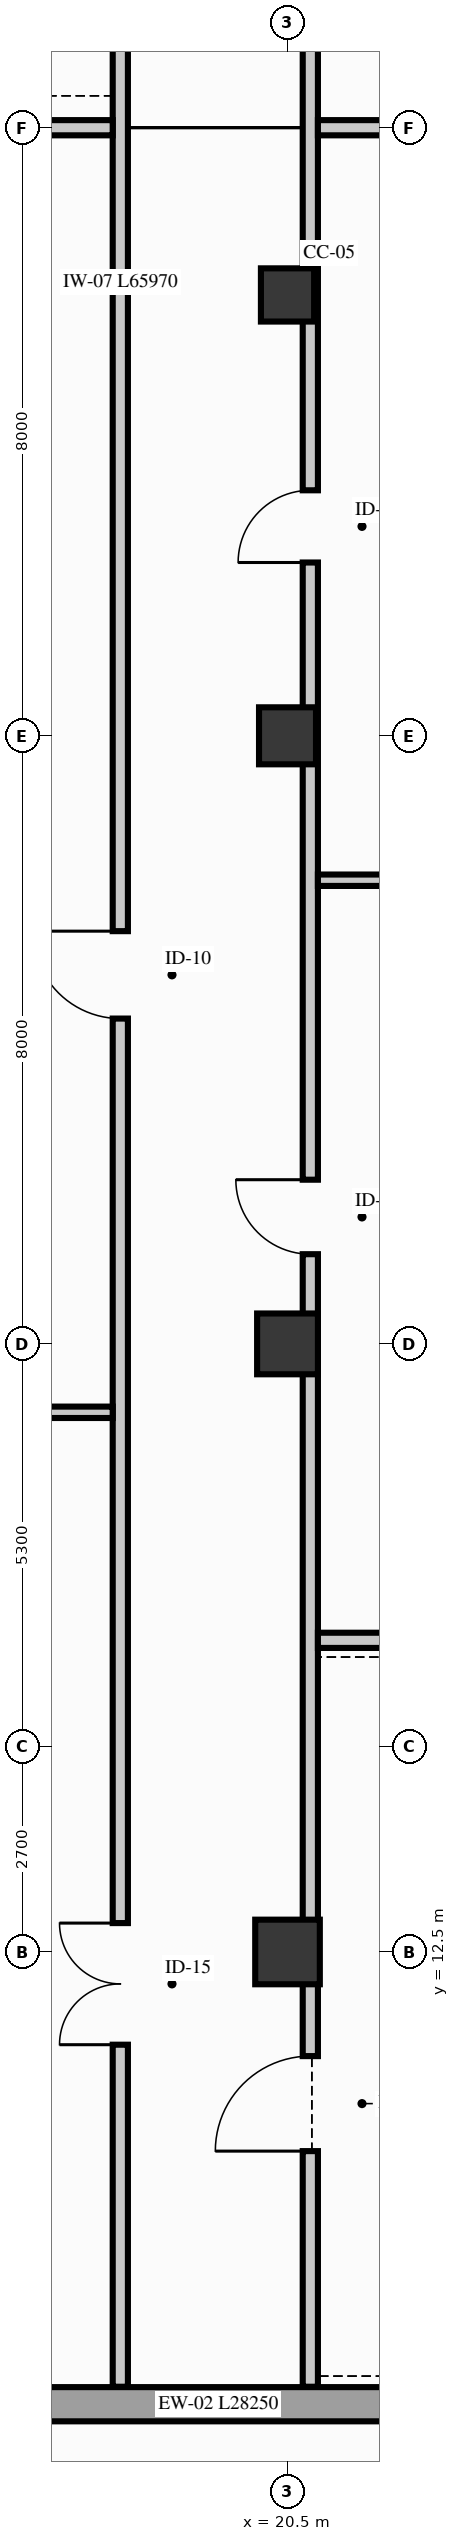
"""IFC4 building model, lengths in metres.
Left out: names, types, materials, properties, quantities, classifications, styles, units other than length and angle.
Written with IfcOpenShell. Run it as: python <this file> out.ifc"""

import sys

from ifc_helpers import new_model, si_unit, direction, frame, frame_2d, origin, origin_2d, place, context, subcontext, project, spatial, rectangle, extrude, element, fill, save


model = new_model("IFC4")
c1 = context("Model", 3, precision=1e-05, world=origin(), true_north=direction((0.0, 1.0)))
c2 = subcontext(c1, "Body", "Model", "MODEL_VIEW")
j1 = project(units=[si_unit("LENGTHUNIT", "METRE"), si_unit("PLANEANGLEUNIT", "RADIAN")], contexts=[c1])
p1 = place(None, origin())
s1 = spatial("IfcSite", under=j1, at=p1, CompositionType="ELEMENT")
p2 = place(p1, origin())
s2 = spatial("IfcBuilding", under=s1, at=p2, CompositionType="ELEMENT")
p3 = place(p2, origin())
s3 = spatial("IfcBuildingStorey", under=s2, at=p3, CompositionType="ELEMENT", Elevation=0.0)
p4 = place(p3, frame((20.5, 12.5, 0.0), z_axis=(0.0, 0.0, 1.0), x_axis=(1.0, 0.0, 0.0)))
e1 = element("IfcColumn", 1, at=p4, inside=s3, PredefinedType="COLUMN", context=c2, shape_type="SweptSolid", body=[
    extrude(rectangle(XDim=0.85, YDim=0.85, at=origin_2d()), origin(), (0.0, 0.0, 1.0), 5.1),
])
p5 = place(p3, frame((20.5, 20.5, 0.0), z_axis=(0.0, 0.0, 1.0), x_axis=(1.0, 0.0, 0.0)))
e2 = element("IfcColumn", 2, at=p5, inside=s3, PredefinedType="COLUMN", context=c2, shape_type="SweptSolid", body=[
    extrude(rectangle(XDim=0.8, YDim=0.8, at=origin_2d()), origin(), (0.0, 0.0, 1.0), 5.1),
])
p6 = place(p3, frame((20.5, 28.5, 0.0), z_axis=(0.0, 0.0, 1.0), x_axis=(1.0, 0.0, 0.0)))
e3 = element("IfcColumn", 3, at=p6, inside=s3, PredefinedType="COLUMN", context=c2, shape_type="SweptSolid", body=[
    extrude(rectangle(XDim=0.75, YDim=0.75, at=origin_2d()), origin(), (0.0, 0.0, 1.0), 5.1),
])
p7 = place(p3, frame((20.5, 34.3, 0.0), z_axis=(0.0, 0.0, 1.0), x_axis=(1.0, 0.0, 0.0)))
e4 = element("IfcColumn", 4, at=p7, inside=s3, PredefinedType="COLUMN", context=c2, shape_type="SweptSolid", body=[
    extrude(rectangle(XDim=0.7, YDim=0.7, at=origin_2d()), origin(), (0.0, 0.0, 1.0), 5.1),
])
p8 = place(p3, frame((6.34, 6.55, 0.0), z_axis=(0.0, 0.0, 1.0), x_axis=(1.0, 0.0, 0.0)))
e5 = element("IfcWall", 5, at=p8, inside=s3, PredefinedType="SOLIDWALL", context=c2, shape_type="SweptSolid", body=[
    extrude(rectangle(XDim=28.25, YDim=0.45, at=frame_2d((14.125, 0.0))), origin(), (0.0, 0.0, 1.0), 4.428),
])
p9 = place(p8, frame((9.0, 0.0, 0.0), z_axis=(0.0, 0.0, 1.0), x_axis=(-1.0, 0.0, 0.0)))
e6 = element("IfcOpeningElement", 6, at=p9, cuts=e5, PredefinedType="OPENING", context=c2, shape_type="SweptSolid", body=[
    extrude(rectangle(XDim=2.0, YDim=2.5, at=frame_2d((1.0, 1.25))), frame((0.0, 0.235, 0.0), z_axis=(0.0, -1.0, 0.0), x_axis=(1.0, 0.0, 0.0)), (0.0, 0.0, 1.0), 0.47),
])
p10 = place(p8, frame((18.7, 0.0, 0.0), z_axis=(0.0, 0.0, 1.0), x_axis=(-1.0, 0.0, 0.0)))
e7 = element("IfcOpeningElement", 7, at=p10, cuts=e5, PredefinedType="OPENING", context=c2, shape_type="SweptSolid", body=[
    extrude(rectangle(XDim=1.2, YDim=2.3, at=frame_2d((0.6, 1.15))), frame((0.0, 0.235, 0.0), z_axis=(0.0, -1.0, 0.0), x_axis=(1.0, 0.0, 0.0)), (0.0, 0.0, 1.0), 0.47),
])
p11 = place(p8, frame((1.65, 0.0, 0.85)))
e8 = element("IfcOpeningElement", 8, at=p11, cuts=e5, PredefinedType="OPENING", context=c2, shape_type="SweptSolid", body=[
    extrude(rectangle(XDim=1.3, YDim=2.15, at=frame_2d((0.65, 1.075))), frame((0.0, 0.235, 0.0), z_axis=(0.0, -1.0, 0.0), x_axis=(1.0, 0.0, 0.0)), (0.0, 0.0, 1.0), 0.47),
])
p12 = place(p8, frame((20.65, 0.0, 0.85)))
e9 = element("IfcOpeningElement", 9, at=p12, cuts=e5, PredefinedType="OPENING", context=c2, shape_type="SweptSolid", body=[
    extrude(rectangle(XDim=1.8, YDim=2.4, at=frame_2d((0.9, 1.2))), frame((0.0, 0.235, 0.0), z_axis=(0.0, -1.0, 0.0), x_axis=(1.0, 0.0, 0.0)), (0.0, 0.0, 1.0), 0.47),
])
p13 = place(p8, frame((24.45, 0.0, 0.85)))
e10 = element("IfcOpeningElement", 10, at=p13, cuts=e5, PredefinedType="OPENING", context=c2, shape_type="SweptSolid", body=[
    extrude(rectangle(XDim=1.9, YDim=2.45, at=frame_2d((0.95, 1.225))), frame((0.0, 0.235, 0.0), z_axis=(0.0, -1.0, 0.0), x_axis=(1.0, 0.0, 0.0)), (0.0, 0.0, 1.0), 0.47),
])
p14 = place(p3, frame((18.3, 6.78, 0.0), z_axis=(0.0, 0.0, 1.0), x_axis=(0.0, 1.0, 0.0)))
e11 = element("IfcWall", 11, at=p14, inside=s3, PredefinedType="PARTITIONING", context=c2, shape_type="SweptSolid", body=[
    extrude(rectangle(XDim=65.97, YDim=0.2, at=frame_2d((32.985, 0.0))), origin(), (0.0, 0.0, 1.0), 4.368),
])
p15 = place(p14, frame((4.5, 0.0, 0.0)))
e12 = element("IfcOpeningElement", 12, at=p15, cuts=e11, PredefinedType="OPENING", context=c2, shape_type="SweptSolid", body=[
    extrude(rectangle(XDim=1.6, YDim=2.3, at=frame_2d((0.8, 1.15))), frame((0.0, 0.11, 0.0), z_axis=(0.0, -1.0, 0.0), x_axis=(1.0, 0.0, 0.0)), (0.0, 0.0, 1.0), 0.22),
])
p16 = place(p14, frame((18.0, 0.0, 0.0)))
e13 = element("IfcOpeningElement", 13, at=p16, cuts=e11, PredefinedType="OPENING", context=c2, shape_type="SweptSolid", body=[
    extrude(rectangle(XDim=1.15, YDim=2.2, at=frame_2d((0.575, 1.1))), frame((0.0, 0.11, 0.0), z_axis=(0.0, -1.0, 0.0), x_axis=(1.0, 0.0, 0.0)), (0.0, 0.0, 1.0), 0.22),
])
p17 = place(p14, frame((38.0, 0.0, 0.0)))
e14 = element("IfcOpeningElement", 14, at=p17, cuts=e11, PredefinedType="OPENING", context=c2, shape_type="SweptSolid", body=[
    extrude(rectangle(XDim=0.98, YDim=2.16, at=frame_2d((0.49, 1.08))), frame((0.0, 0.11, 0.0), z_axis=(0.0, -1.0, 0.0), x_axis=(1.0, 0.0, 0.0)), (0.0, 0.0, 1.0), 0.22),
])
p18 = place(p14, frame((56.0, 0.0, 0.0)))
e15 = element("IfcOpeningElement", 15, at=p18, cuts=e11, PredefinedType="OPENING", context=c2, shape_type="SweptSolid", body=[
    extrude(rectangle(XDim=1.15, YDim=2.2, at=frame_2d((0.575, 1.1))), frame((0.0, 0.11, 0.0), z_axis=(0.0, -1.0, 0.0), x_axis=(1.0, 0.0, 0.0)), (0.0, 0.0, 1.0), 0.22),
])
p19 = place(p3, frame((20.8, 6.78, 0.0), z_axis=(0.0, 0.0, 1.0), x_axis=(0.0, 1.0, 0.0)))
e16 = element("IfcWall", 16, at=p19, inside=s3, PredefinedType="PARTITIONING", context=c2, shape_type="SweptSolid", body=[
    extrude(rectangle(XDim=68.17, YDim=0.2, at=frame_2d((34.085, 0.0))), origin(), (0.0, 0.0, 1.0), 4.368),
])
p20 = place(p19, frame((3.1, 0.0, 0.0)))
e17 = element("IfcOpeningElement", 17, at=p20, cuts=e16, PredefinedType="OPENING", context=c2, shape_type="SweptSolid", body=[
    extrude(rectangle(XDim=1.25, YDim=2.2, at=frame_2d((0.625, 1.1))), frame((0.0, 0.11, 0.0), z_axis=(0.0, -1.0, 0.0), x_axis=(1.0, 0.0, 0.0)), (0.0, 0.0, 1.0), 0.22),
])
p21 = place(p19, frame((14.9, 0.0, 0.0)))
e18 = element("IfcOpeningElement", 18, at=p21, cuts=e16, PredefinedType="OPENING", context=c2, shape_type="SweptSolid", body=[
    extrude(rectangle(XDim=0.98, YDim=2.16, at=frame_2d((0.49, 1.08))), frame((0.0, 0.11, 0.0), z_axis=(0.0, -1.0, 0.0), x_axis=(1.0, 0.0, 0.0)), (0.0, 0.0, 1.0), 0.22),
])
p22 = place(p19, frame((24.0, 0.0, 0.0)))
e19 = element("IfcOpeningElement", 19, at=p22, cuts=e16, PredefinedType="OPENING", context=c2, shape_type="SweptSolid", body=[
    extrude(rectangle(XDim=0.95, YDim=2.15, at=frame_2d((0.475, 1.075))), frame((0.0, 0.11, 0.0), z_axis=(0.0, -1.0, 0.0), x_axis=(1.0, 0.0, 0.0)), (0.0, 0.0, 1.0), 0.22),
])
p23 = place(p19, frame((38.9, 0.0, 0.0)))
e20 = element("IfcOpeningElement", 20, at=p23, cuts=e16, PredefinedType="OPENING", context=c2, shape_type="SweptSolid", body=[
    extrude(rectangle(XDim=0.95, YDim=2.15, at=frame_2d((0.475, 1.075))), frame((0.0, 0.11, 0.0), z_axis=(0.0, -1.0, 0.0), x_axis=(1.0, 0.0, 0.0)), (0.0, 0.0, 1.0), 0.22),
])
p24 = place(p19, frame((56.0, 0.0, 0.0)))
e21 = element("IfcOpeningElement", 21, at=p24, cuts=e16, PredefinedType="OPENING", context=c2, shape_type="SweptSolid", body=[
    extrude(rectangle(XDim=1.68, YDim=2.34, at=frame_2d((0.84, 1.17))), frame((0.0, 0.11, 0.0), z_axis=(0.0, -1.0, 0.0), x_axis=(1.0, 0.0, 0.0)), (0.0, 0.0, 1.0), 0.22),
])
p25 = place(p3, frame((6.78, 19.6, 0.0), z_axis=(0.0, 0.0, 1.0), x_axis=(1.0, 0.0, 0.0)))
e22 = element("IfcWall", 22, at=p25, inside=s3, PredefinedType="PARTITIONING", context=c2, shape_type="SweptSolid", body=[
    extrude(rectangle(XDim=11.42, YDim=0.15, at=frame_2d((5.71, 0.0))), origin(), (0.0, 0.0, 1.0), 4.428),
])
p26 = place(p3, frame((20.9, 16.6, 0.0), z_axis=(0.0, 0.0, 1.0), x_axis=(1.0, 0.0, 0.0)))
e23 = element("IfcWall", 23, at=p26, inside=s3, PredefinedType="PARTITIONING", context=c2, shape_type="SweptSolid", body=[
    extrude(rectangle(XDim=13.25, YDim=0.2, at=frame_2d((6.625, 0.0))), origin(), (0.0, 0.0, 1.0), 4.428),
])
p27 = place(p3, frame((20.9, 26.6, 0.0), z_axis=(0.0, 0.0, 1.0), x_axis=(1.0, 0.0, 0.0)))
e24 = element("IfcWall", 24, at=p27, inside=s3, PredefinedType="PARTITIONING", context=c2, shape_type="SweptSolid", body=[
    extrude(rectangle(XDim=13.25, YDim=0.15, at=frame_2d((6.625, 0.0))), origin(), (0.0, 0.0, 1.0), 4.428),
])
p28 = place(p3, frame((6.78, 36.5, 0.0), z_axis=(0.0, 0.0, 1.0), x_axis=(1.0, 0.0, 0.0)))
e25 = element("IfcWall", 25, at=p28, inside=s3, PredefinedType="PARTITIONING", context=c2, shape_type="SweptSolid", body=[
    extrude(rectangle(XDim=11.42, YDim=0.2, at=frame_2d((5.71, 0.0))), origin(), (0.0, 0.0, 1.0), 4.86),
])
p29 = place(p3, frame((20.9, 36.5, 0.0), z_axis=(0.0, 0.0, 1.0), x_axis=(1.0, 0.0, 0.0)))
e26 = element("IfcWall", 26, at=p29, inside=s3, PredefinedType="PARTITIONING", context=c2, shape_type="SweptSolid", body=[
    extrude(rectangle(XDim=7.15, YDim=0.2, at=frame_2d((3.575, 0.0))), origin(), (0.0, 0.0, 1.0), 4.86),
])
p30 = place(p15, origin())
e27 = element("IfcDoor", 27, at=p30, inside=s3, OperationType="DOUBLE_DOOR_SINGLE_SWING", PredefinedType="DOOR", context=c2, shape_type="SweptSolid", body=[
    extrude(rectangle(XDim=1.6, YDim=2.3, at=frame_2d((0.8, 1.15))), frame((0.0, 0.025, 0.0), z_axis=(0.0, -1.0, 0.0), x_axis=(1.0, 0.0, 0.0)), (0.0, 0.0, 1.0), 0.05),
])
fill(e12, e27)
p31 = place(p16, origin())
e28 = element("IfcDoor", 28, at=p31, inside=s3, OperationType="SINGLE_SWING_RIGHT", PredefinedType="DOOR", context=c2, shape_type="SweptSolid", body=[
    extrude(rectangle(XDim=1.15, YDim=2.2, at=frame_2d((0.575, 1.1))), frame((0.0, 0.025, 0.0), z_axis=(0.0, -1.0, 0.0), x_axis=(1.0, 0.0, 0.0)), (0.0, 0.0, 1.0), 0.05),
])
fill(e13, e28)
p32 = place(p20, origin())
e29 = element("IfcDoor", 29, at=p32, inside=s3, OperationType="SINGLE_SWING_LEFT", PredefinedType="DOOR", context=c2, shape_type="SweptSolid", body=[
    extrude(rectangle(XDim=1.25, YDim=2.2, at=frame_2d((0.625, 1.1))), frame((0.0, 0.025, 0.0), z_axis=(0.0, -1.0, 0.0), x_axis=(1.0, 0.0, 0.0)), (0.0, 0.0, 1.0), 0.05),
])
fill(e17, e29)
p33 = place(p21, origin())
e30 = element("IfcDoor", 30, at=p33, inside=s3, OperationType="SINGLE_SWING_RIGHT", PredefinedType="DOOR", context=c2, shape_type="SweptSolid", body=[
    extrude(rectangle(XDim=0.98, YDim=2.16, at=frame_2d((0.49, 1.08))), frame((0.0, 0.025, 0.0), z_axis=(0.0, -1.0, 0.0), x_axis=(1.0, 0.0, 0.0)), (0.0, 0.0, 1.0), 0.05),
])
fill(e18, e30)
p34 = place(p22, origin())
e31 = element("IfcDoor", 31, at=p34, inside=s3, OperationType="SINGLE_SWING_LEFT", PredefinedType="DOOR", context=c2, shape_type="SweptSolid", body=[
    extrude(rectangle(XDim=0.95, YDim=2.15, at=frame_2d((0.475, 1.075))), frame((0.0, 0.025, 0.0), z_axis=(0.0, -1.0, 0.0), x_axis=(1.0, 0.0, 0.0)), (0.0, 0.0, 1.0), 0.05),
])
fill(e19, e31)
save(model, sys.argv[1])
